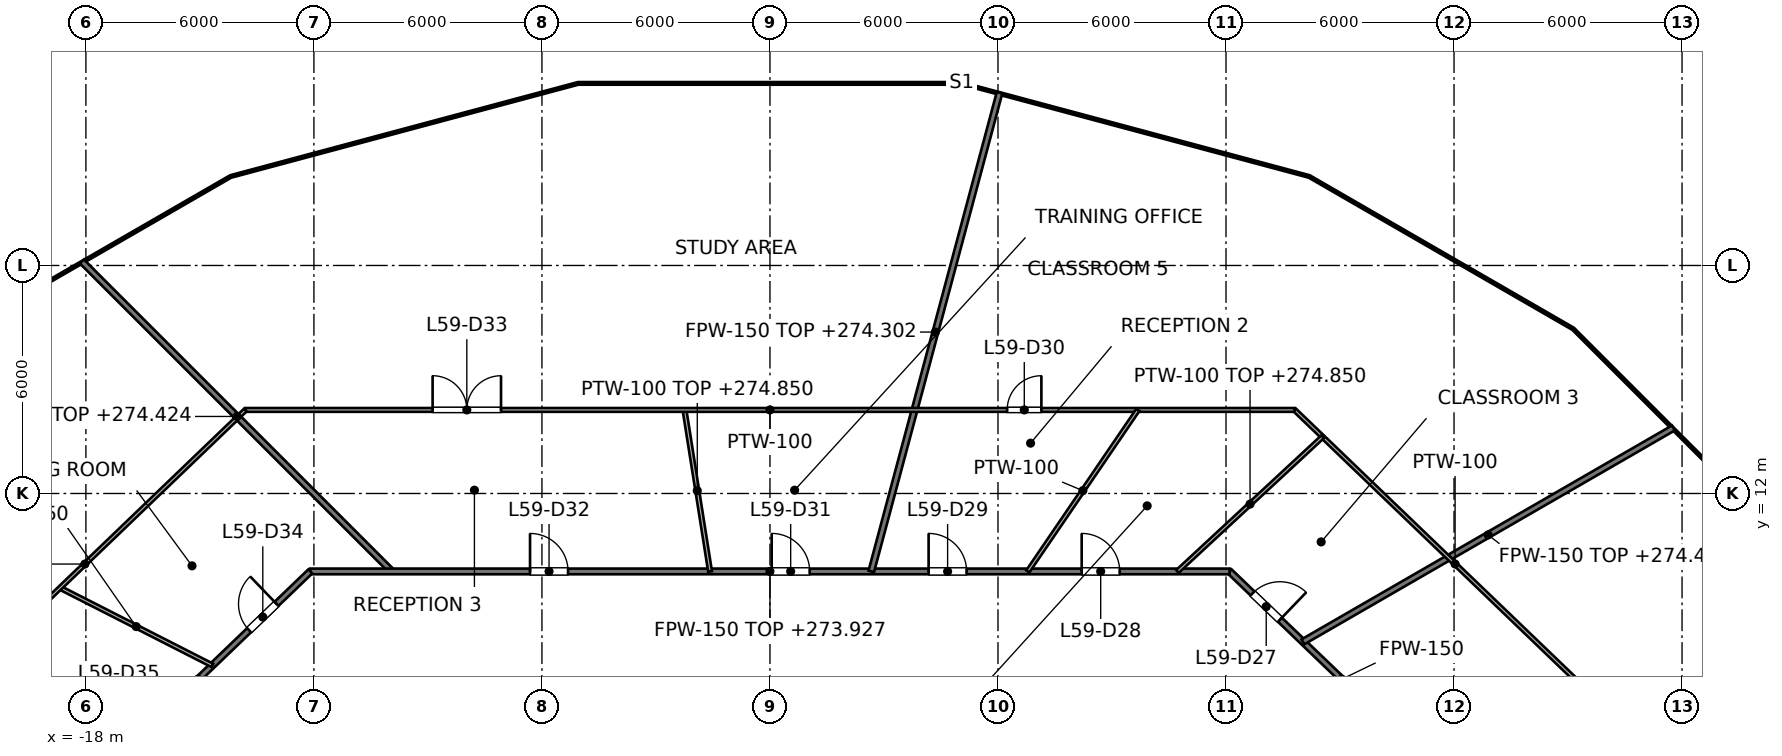
"""IFC4 building model, lengths in metres.
Left out: names, types, materials, properties, quantities, classifications, styles, units other than length and angle.
Written with IfcOpenShell. Run it as: python <this file> out.ifc"""

import sys

from ifc_helpers import new_model, si_unit, direction, frame, frame_2d, origin, place, context, subcontext, project, spatial, rectangle, extrude, element, fill, save


model = new_model("IFC4")
c1 = context("Model", 3, precision=1e-05, world=origin(), true_north=direction((0.0, 1.0)))
c2 = subcontext(c1, "Body", "Model", "MODEL_VIEW")
j1 = project(units=[si_unit("LENGTHUNIT", "METRE"), si_unit("PLANEANGLEUNIT", "RADIAN")], contexts=[c1])
p1 = place(None, origin())
s1 = spatial("IfcSite", under=j1, at=p1, CompositionType="ELEMENT")
p2 = place(p1, origin())
s2 = spatial("IfcBuilding", under=s1, at=p2, CompositionType="ELEMENT")
p3 = place(p2, frame((0.0, 0.0, 271.0)))
s3 = spatial("IfcBuildingStorey", under=s2, at=p3, CompositionType="ELEMENT", Elevation=271.0)
p4 = place(p3, frame((-18.105, 18.105, 0.0), z_axis=(0.0, 0.0, 1.0), x_axis=(0.707106781187, -0.707106781187, 0.0)))
e1 = element("IfcWall", 1, at=p4, inside=s3, PredefinedType="PARTITIONING", context=c2, shape_type="SweptSolid", body=[
    extrude(rectangle(XDim=11.534, YDim=0.15, at=frame_2d((5.767, 0.0))), origin(), (0.0, 0.0, 1.0), 3.424),
])
p5 = place(p3, frame((12.095, 9.949, 0.0), z_axis=(0.0, 0.0, 1.0), x_axis=(0.721260976692, -0.69266341285, 0.0)))
e2 = element("IfcWall", 2, at=p5, inside=s3, PredefinedType="PARTITIONING", context=c2, shape_type="SweptSolid", body=[
    extrude(rectangle(XDim=8.187, YDim=0.15, at=frame_2d((4.094, 0.0))), origin(), (0.0, 0.0, 1.0), 2.918),
])
p6 = place(p5, frame((0.835, 0.0, 0.0)))
e3 = element("IfcOpeningElement", 3, at=p6, cuts=e2, PredefinedType="OPENING", context=c2, shape_type="SweptSolid", body=[
    extrude(rectangle(XDim=1.0, YDim=2.1, at=frame_2d((0.5, 1.05))), frame((0.0, 0.075, 0.0), z_axis=(0.0, -1.0, 0.0), x_axis=(1.0, 0.0, 0.0)), (0.0, 0.0, 1.0), 0.15),
])
p7 = place(p3, frame((-12.095, 9.949, 0.0), z_axis=(0.0, 0.0, 1.0), x_axis=(1.0, 0.0, 0.0)))
e4 = element("IfcWall", 4, at=p7, inside=s3, PredefinedType="PARTITIONING", context=c2, shape_type="SweptSolid", body=[
    extrude(rectangle(XDim=24.19, YDim=0.15, at=frame_2d((12.095, 0.0))), origin(), (0.0, 0.0, 1.0), 2.927),
])
p8 = place(p7, frame((20.297, 0.0, 0.0)))
e5 = element("IfcOpeningElement", 5, at=p8, cuts=e4, PredefinedType="OPENING", context=c2, shape_type="SweptSolid", body=[
    extrude(rectangle(XDim=1.0, YDim=2.1, at=frame_2d((0.5, 1.05))), frame((0.0, 0.075, 0.0), z_axis=(0.0, -1.0, 0.0), x_axis=(1.0, 0.0, 0.0)), (0.0, 0.0, 1.0), 0.15),
])
p9 = place(p7, frame((16.27, 0.0, 0.0)))
e6 = element("IfcOpeningElement", 6, at=p9, cuts=e4, PredefinedType="OPENING", context=c2, shape_type="SweptSolid", body=[
    extrude(rectangle(XDim=1.0, YDim=2.1, at=frame_2d((0.5, 1.05))), frame((0.0, 0.075, 0.0), z_axis=(0.0, -1.0, 0.0), x_axis=(1.0, 0.0, 0.0)), (0.0, 0.0, 1.0), 0.15),
])
p10 = place(p7, frame((12.14, 0.0, 0.0)))
e7 = element("IfcOpeningElement", 7, at=p10, cuts=e4, PredefinedType="OPENING", context=c2, shape_type="SweptSolid", body=[
    extrude(rectangle(XDim=1.0, YDim=2.1, at=frame_2d((0.5, 1.05))), frame((0.0, 0.075, 0.0), z_axis=(0.0, -1.0, 0.0), x_axis=(1.0, 0.0, 0.0)), (0.0, 0.0, 1.0), 0.15),
])
p11 = place(p7, frame((5.782, 0.0, 0.0)))
e8 = element("IfcOpeningElement", 8, at=p11, cuts=e4, PredefinedType="OPENING", context=c2, shape_type="SweptSolid", body=[
    extrude(rectangle(XDim=1.0, YDim=2.1, at=frame_2d((0.5, 1.05))), frame((0.0, 0.075, 0.0), z_axis=(0.0, -1.0, 0.0), x_axis=(1.0, 0.0, 0.0)), (0.0, 0.0, 1.0), 0.15),
])
p12 = place(p3, frame((14.024, 8.096, 0.0), z_axis=(0.0, 0.0, 1.0), x_axis=(0.866020158842, 0.500009084397, 0.0)))
e9 = element("IfcWall", 9, at=p12, inside=s3, PredefinedType="PARTITIONING", context=c2, shape_type="SweptSolid", body=[
    extrude(rectangle(XDim=11.256, YDim=0.15, at=frame_2d((5.628, 0.0))), origin(), (0.0, 0.0, 1.0), 3.475),
])
p13 = place(p3, frame((-18.0, 4.278, 0.0), z_axis=(0.0, 0.0, 1.0), x_axis=(0.721231770915, 0.692693823145, 0.0)))
e10 = element("IfcWall", 10, at=p13, inside=s3, PredefinedType="PARTITIONING", context=c2, shape_type="SweptSolid", body=[
    extrude(rectangle(XDim=8.187, YDim=0.15, at=frame_2d((4.094, 0.0))), origin(), (0.0, 0.0, 1.0), 2.918),
])
p14 = place(p13, frame((5.954, 0.0, 0.0)))
e11 = element("IfcOpeningElement", 11, at=p14, cuts=e10, PredefinedType="OPENING", context=c2, shape_type="SweptSolid", body=[
    extrude(rectangle(XDim=1.0, YDim=2.1, at=frame_2d((0.5, 1.05))), frame((0.0, 0.075, 0.0), z_axis=(0.0, -1.0, 0.0), x_axis=(1.0, 0.0, 0.0)), (0.0, 0.0, 1.0), 0.15),
])
p15 = place(p13, frame((1.807, 0.0, 0.0)))
e12 = element("IfcOpeningElement", 12, at=p15, cuts=e10, PredefinedType="OPENING", context=c2, shape_type="SweptSolid", body=[
    extrude(rectangle(XDim=1.0, YDim=2.1, at=frame_2d((0.5, 1.05))), frame((0.0, 0.075, 0.0), z_axis=(0.0, -1.0, 0.0), x_axis=(1.0, 0.0, 0.0)), (0.0, 0.0, 1.0), 0.15),
])
p16 = place(p3, frame((2.666, 9.949, 0.0), z_axis=(0.0, 0.0, 1.0), x_axis=(0.258771640592, 0.965938527043, 0.0)))
e13 = element("IfcWall", 13, at=p16, inside=s3, PredefinedType="PARTITIONING", context=c2, shape_type="SweptSolid", body=[
    extrude(rectangle(XDim=13.042, YDim=0.15, at=frame_2d((6.521, 0.0))), origin(), (0.0, 0.0, 1.0), 3.302),
])
p17 = place(p3, frame((-2.249, 14.199, 0.0), z_axis=(0.0, 0.0, 1.0), x_axis=(0.156425811894, -0.98768971108, 0.0)))
e14 = element("IfcWall", 14, at=p17, inside=s3, PredefinedType="PARTITIONING", context=c2, shape_type="SweptSolid", body=[
    extrude(rectangle(XDim=4.303, YDim=0.1, at=frame_2d((2.151, 0.0))), origin(), (0.0, 0.0, 1.0), 3.85),
])
p18 = place(p3, frame((13.805, 14.199, 0.0), z_axis=(0.0, 0.0, 1.0), x_axis=(0.721317314508, -0.692604744274, 0.0)))
e15 = element("IfcWall", 15, at=p18, inside=s3, PredefinedType="PARTITIONING", context=c2, shape_type="SweptSolid", body=[
    extrude(rectangle(XDim=11.708, YDim=0.1, at=frame_2d((5.854, 0.0))), origin(), (0.0, 0.0, 1.0), 2.927),
])
p19 = place(p3, frame((-18.68, 9.518, 0.0), z_axis=(0.0, 0.0, 1.0), x_axis=(0.890982762067, -0.454037132512, 0.0)))
e16 = element("IfcWall", 16, at=p19, inside=s3, PredefinedType="PARTITIONING", context=c2, shape_type="SweptSolid", body=[
    extrude(rectangle(XDim=4.5, YDim=0.1, at=frame_2d((2.25, 0.0))), origin(), (0.0, 0.0, 1.0), 3.85),
])
p20 = place(p3, frame((-13.805, 14.199, 0.0), z_axis=(0.0, 0.0, 1.0), x_axis=(1.0, 0.0, 0.0)))
e17 = element("IfcWall", 17, at=p20, inside=s3, PredefinedType="PARTITIONING", context=c2, shape_type="SweptSolid", body=[
    extrude(rectangle(XDim=27.61, YDim=0.1, at=frame_2d((13.805, 0.0))), origin(), (0.0, 0.0, 1.0), 2.927),
])
p21 = place(p20, frame((20.047, 0.0, 0.0)))
e18 = element("IfcOpeningElement", 18, at=p21, cuts=e17, PredefinedType="OPENING", context=c2, shape_type="SweptSolid", body=[
    extrude(rectangle(XDim=0.9, YDim=2.1, at=frame_2d((0.45, 1.05))), frame((0.0, 0.05, 0.0), z_axis=(0.0, -1.0, 0.0), x_axis=(1.0, 0.0, 0.0)), (0.0, 0.0, 1.0), 0.1),
])
p22 = place(p20, frame((4.928, 0.0, 0.0)))
e19 = element("IfcOpeningElement", 19, at=p22, cuts=e17, PredefinedType="OPENING", context=c2, shape_type="SweptSolid", body=[
    extrude(rectangle(XDim=1.8, YDim=2.1, at=frame_2d((0.9, 1.05))), frame((0.0, 0.05, 0.0), z_axis=(0.0, -1.0, 0.0), x_axis=(1.0, 0.0, 0.0)), (0.0, 0.0, 1.0), 0.1),
])
p23 = place(p3, frame((10.723, 9.949, 0.0), z_axis=(0.0, 0.0, 1.0), x_axis=(0.733112222909, 0.680107688989, 0.0)))
e20 = element("IfcWall", 20, at=p23, inside=s3, PredefinedType="PARTITIONING", context=c2, shape_type="SweptSolid", body=[
    extrude(rectangle(XDim=5.209, YDim=0.1, at=frame_2d((2.605, 0.0))), origin(), (0.0, 0.0, 1.0), 3.85),
])
p24 = place(p3, frame((-22.25, 6.089, 0.0), z_axis=(0.0, 0.0, 1.0), x_axis=(0.721429821881, 0.692487553751, 0.0)))
e21 = element("IfcWall", 21, at=p24, inside=s3, PredefinedType="PARTITIONING", context=c2, shape_type="SweptSolid", body=[
    extrude(rectangle(XDim=11.708, YDim=0.1, at=frame_2d((5.854, 0.0))), origin(), (0.0, 0.0, 1.0), 2.927),
])
p25 = place(p3, frame((6.784, 9.949, 0.0), z_axis=(0.0, 0.0, 1.0), x_axis=(0.563236665665, 0.826295624127, 0.0)))
e22 = element("IfcWall", 22, at=p25, inside=s3, PredefinedType="PARTITIONING", context=c2, shape_type="SweptSolid", body=[
    extrude(rectangle(XDim=5.144, YDim=0.1, at=frame_2d((2.572, 0.0))), origin(), (0.0, 0.0, 1.0), 2.927),
])
p26 = place(p6, origin())
e23 = element("IfcDoor", 23, at=p26, inside=s3, OperationType="SINGLE_SWING_RIGHT", PredefinedType="DOOR", context=c2, shape_type="SweptSolid", body=[
    extrude(rectangle(XDim=1.0, YDim=2.1, at=frame_2d((0.5, 1.05))), frame((0.0, 0.025, 0.0), z_axis=(0.0, -1.0, 0.0), x_axis=(1.0, 0.0, 0.0)), (0.0, 0.0, 1.0), 0.05),
])
fill(e3, e23)
p27 = place(p8, origin())
e24 = element("IfcDoor", 24, at=p27, inside=s3, OperationType="SINGLE_SWING_LEFT", PredefinedType="DOOR", context=c2, shape_type="SweptSolid", body=[
    extrude(rectangle(XDim=1.0, YDim=2.1, at=frame_2d((0.5, 1.05))), frame((0.0, 0.025, 0.0), z_axis=(0.0, -1.0, 0.0), x_axis=(1.0, 0.0, 0.0)), (0.0, 0.0, 1.0), 0.05),
])
fill(e5, e24)
p28 = place(p9, origin())
e25 = element("IfcDoor", 25, at=p28, inside=s3, OperationType="SINGLE_SWING_LEFT", PredefinedType="DOOR", context=c2, shape_type="SweptSolid", body=[
    extrude(rectangle(XDim=1.0, YDim=2.1, at=frame_2d((0.5, 1.05))), frame((0.0, 0.025, 0.0), z_axis=(0.0, -1.0, 0.0), x_axis=(1.0, 0.0, 0.0)), (0.0, 0.0, 1.0), 0.05),
])
fill(e6, e25)
p29 = place(p21, origin())
e26 = element("IfcDoor", 26, at=p29, inside=s3, OperationType="SINGLE_SWING_RIGHT", PredefinedType="DOOR", context=c2, shape_type="SweptSolid", body=[
    extrude(rectangle(XDim=0.9, YDim=2.1, at=frame_2d((0.45, 1.05))), frame((0.0, 0.025, 0.0), z_axis=(0.0, -1.0, 0.0), x_axis=(1.0, 0.0, 0.0)), (0.0, 0.0, 1.0), 0.05),
])
fill(e18, e26)
p30 = place(p10, origin())
e27 = element("IfcDoor", 27, at=p30, inside=s3, OperationType="SINGLE_SWING_LEFT", PredefinedType="DOOR", context=c2, shape_type="SweptSolid", body=[
    extrude(rectangle(XDim=1.0, YDim=2.1, at=frame_2d((0.5, 1.05))), frame((0.0, 0.025, 0.0), z_axis=(0.0, -1.0, 0.0), x_axis=(1.0, 0.0, 0.0)), (0.0, 0.0, 1.0), 0.05),
])
fill(e7, e27)
p31 = place(p11, origin())
e28 = element("IfcDoor", 28, at=p31, inside=s3, OperationType="SINGLE_SWING_LEFT", PredefinedType="DOOR", context=c2, shape_type="SweptSolid", body=[
    extrude(rectangle(XDim=1.0, YDim=2.1, at=frame_2d((0.5, 1.05))), frame((0.0, 0.025, 0.0), z_axis=(0.0, -1.0, 0.0), x_axis=(1.0, 0.0, 0.0)), (0.0, 0.0, 1.0), 0.05),
])
fill(e8, e28)
p32 = place(p22, origin())
e29 = element("IfcDoor", 29, at=p32, inside=s3, OperationType="DOUBLE_DOOR_SINGLE_SWING", PredefinedType="DOOR", context=c2, shape_type="SweptSolid", body=[
    extrude(rectangle(XDim=1.8, YDim=2.1, at=frame_2d((0.9, 1.05))), frame((0.0, 0.025, 0.0), z_axis=(0.0, -1.0, 0.0), x_axis=(1.0, 0.0, 0.0)), (0.0, 0.0, 1.0), 0.05),
])
fill(e19, e29)
p33 = place(p14, origin())
e30 = element("IfcDoor", 30, at=p33, inside=s3, OperationType="SINGLE_SWING_RIGHT", PredefinedType="DOOR", context=c2, shape_type="SweptSolid", body=[
    extrude(rectangle(XDim=1.0, YDim=2.1, at=frame_2d((0.5, 1.05))), frame((0.0, 0.025, 0.0), z_axis=(0.0, -1.0, 0.0), x_axis=(1.0, 0.0, 0.0)), (0.0, 0.0, 1.0), 0.05),
])
fill(e11, e30)
save(model, sys.argv[1])
